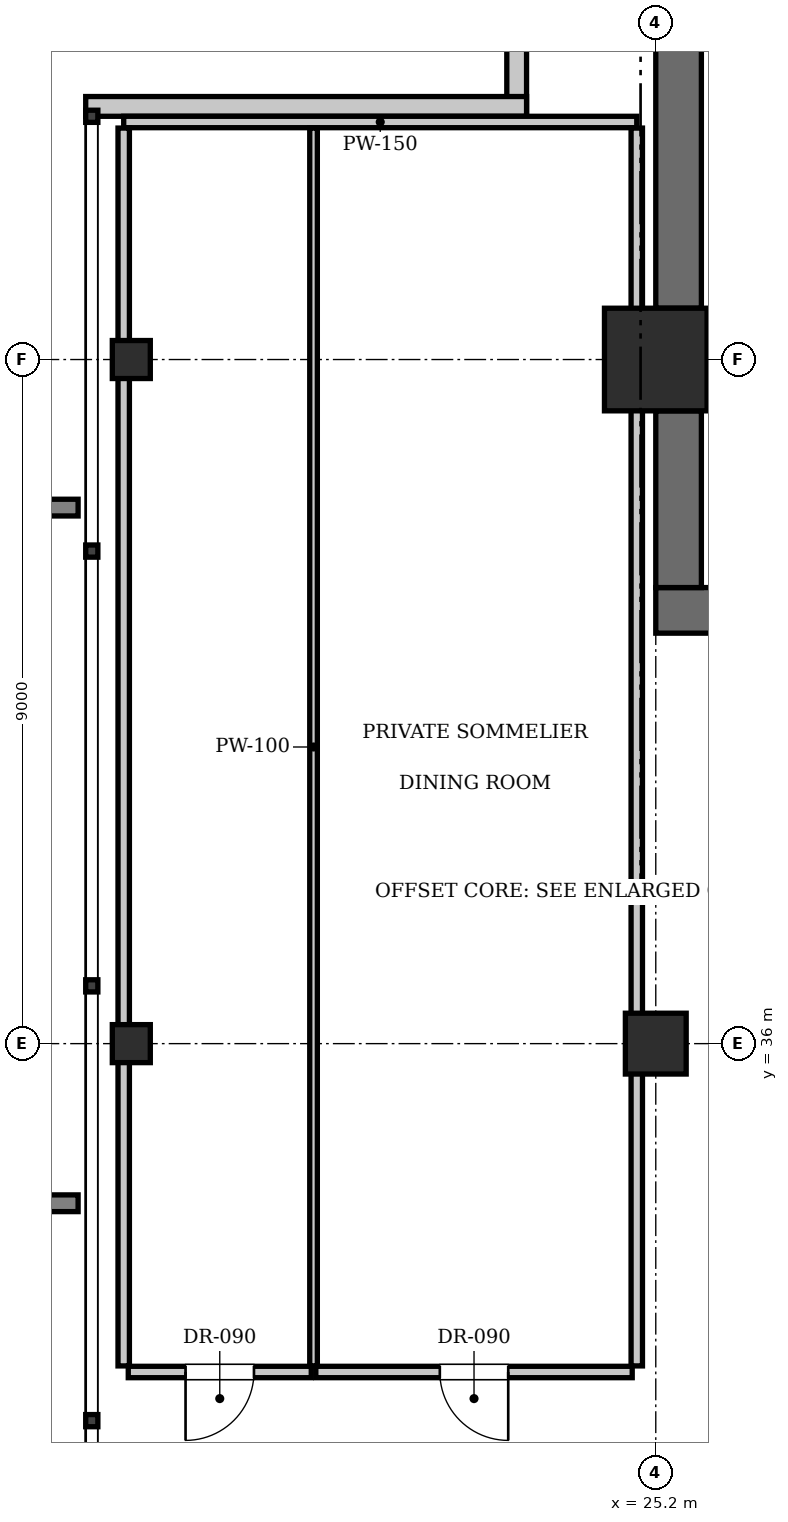
"""IFC4 building model, lengths in metres.
Left out: names, types, materials, properties, quantities, classifications, styles, units other than length and angle.
Written with IfcOpenShell. Run it as: python <this file> out.ifc"""

import sys

from ifc_helpers import new_model, si_unit, direction, frame, frame_2d, origin, origin_2d, place, context, subcontext, project, spatial, rectangle, i_section, extrude, element, fill, save


model = new_model("IFC4")
c1 = context("Model", 3, precision=1e-05, world=origin(), true_north=direction((0.0, 1.0)))
c2 = subcontext(c1, "Body", "Model", "MODEL_VIEW")
j1 = project(units=[si_unit("LENGTHUNIT", "METRE"), si_unit("PLANEANGLEUNIT", "RADIAN")], contexts=[c1])
p1 = place(None, origin())
s1 = spatial("IfcSite", under=j1, at=p1, CompositionType="ELEMENT")
p2 = place(p1, origin())
s2 = spatial("IfcBuilding", under=s1, at=p2, CompositionType="ELEMENT")
p3 = place(p2, frame((0.0, 0.0, 341.25)))
s3 = spatial("IfcBuildingStorey", under=s2, at=p3, CompositionType="ELEMENT", Elevation=341.25)
p4 = place(p3, frame((25.2, 45.0, 0.0), z_axis=(0.0, 0.0, 1.0), x_axis=(1.0, 0.0, 0.0)))
e1 = element("IfcColumn", 1, at=p4, inside=s3, PredefinedType="COLUMN", context=c2, shape_type="SweptSolid", body=[
    extrude(rectangle(XDim=1.35, YDim=1.35, at=origin_2d()), origin(), (0.0, 0.0, 1.0), 3.85),
])
p5 = place(p3, frame((25.2, 41.7, 0.0), z_axis=(0.0, 0.0, 1.0), x_axis=(1.0, 0.0, 0.0)))
e2 = element("IfcWall", 2, at=p5, inside=s3, PredefinedType="SHEAR", context=c2, shape_type="SweptSolid", body=[
    extrude(rectangle(XDim=6.8, YDim=0.6, at=frame_2d((3.4, 0.0))), origin(), (0.0, 0.0, 1.0), 3.85),
])
p6 = place(p5, frame((1.65, 0.0, 0.0)))
e3 = element("IfcOpeningElement", 3, at=p6, cuts=e2, PredefinedType="OPENING", context=c2, shape_type="SweptSolid", body=[
    extrude(rectangle(XDim=1.15, YDim=2.15, at=frame_2d((0.575, 1.075))), frame((0.0, 0.31, 0.0), z_axis=(0.0, -1.0, 0.0), x_axis=(1.0, 0.0, 0.0)), (0.0, 0.0, 1.0), 0.62),
])
p7 = place(p5, frame((5.15, 0.0, 0.0)))
e4 = element("IfcOpeningElement", 4, at=p7, cuts=e2, PredefinedType="OPENING", context=c2, shape_type="SweptSolid", body=[
    extrude(rectangle(XDim=1.1, YDim=2.2, at=frame_2d((0.55, 1.1))), frame((0.0, 0.31, 0.0), z_axis=(0.0, -1.0, 0.0), x_axis=(1.0, 0.0, 0.0)), (0.0, 0.0, 1.0), 0.62),
])
p8 = place(p3, frame((25.5, 42.0, 0.0), z_axis=(0.0, 0.0, 1.0), x_axis=(0.0, 1.0, 0.0)))
e5 = element("IfcWall", 5, at=p8, inside=s3, PredefinedType="SHEAR", context=c2, shape_type="SweptSolid", body=[
    extrude(rectangle(XDim=2.325, YDim=0.6, at=frame_2d((1.163, 0.0))), origin(), (0.0, 0.0, 1.0), 3.85),
])
p9 = place(p3, frame((25.5, 45.675, 0.0), z_axis=(0.0, 0.0, 1.0), x_axis=(0.0, 1.0, 0.0)))
e6 = element("IfcWall", 6, at=p9, inside=s3, PredefinedType="SHEAR", context=c2, shape_type="SweptSolid", body=[
    extrude(rectangle(XDim=7.725, YDim=0.6, at=frame_2d((3.862, 0.0))), origin(), (0.0, 0.0, 1.0), 3.85),
])
p10 = place(p3, frame((25.2, 36.0, 0.0), z_axis=(0.0, 0.0, 1.0), x_axis=(1.0, 0.0, 0.0)))
e7 = element("IfcColumn", 7, at=p10, inside=s3, PredefinedType="COLUMN", context=c2, shape_type="SweptSolid", body=[
    extrude(rectangle(XDim=0.8, YDim=0.8, at=origin_2d()), origin(), (0.0, 0.0, 1.0), 3.85),
])
for number, where, z_axis, x_axis in (
    (8, (18.3, 36.0, 0.0), (0.0, 0.0, 1.0), (1.0, 0.0, 0.0)),
    (9, (18.3, 45.0, 0.0), (0.0, 0.0, 1.0), (1.0, 0.0, 0.0)),
):
    element("IfcColumn", number, at=place(p3, frame(where, z_axis=z_axis, x_axis=x_axis)), inside=s3, PredefinedType="COLUMN", context=c2, shape_type="SweptSolid", body=[
        extrude(i_section(OverallWidth=0.5, OverallDepth=0.5, WebThickness=0.022, FlangeThickness=0.032, at=origin_2d()), origin(), (0.0, 0.0, 1.0), 3.85),
    ])
for number, where, z_axis, x_axis in (
    (10, (23.37, 48.2, 0.0), (0.0, 0.0, 1.0), (0.0, 1.0, 0.0)),
    (11, (17.7, 48.33, 0.0), (0.0, 0.0, 1.0), (1.0, 0.0, 0.0)),
):
    element("IfcWall", number, at=place(p3, frame(where, z_axis=z_axis, x_axis=x_axis)), inside=s3, PredefinedType="SOLIDWALL", context=c2, shape_type="SweptSolid", body=[
        extrude(rectangle(XDim=5.8, YDim=0.26, at=frame_2d((2.9, 0.0))), origin(), (0.0, 0.0, 1.0), 3.61),
    ])
p11 = place(p3, frame((18.2, 48.125, 0.0), z_axis=(0.0, 0.0, 1.0), x_axis=(1.0, 0.0, 0.0)))
e12 = element("IfcWall", 12, at=p11, inside=s3, PredefinedType="PARTITIONING", context=c2, shape_type="SweptSolid", body=[
    extrude(rectangle(XDim=6.75, YDim=0.15, at=frame_2d((3.375, 0.0))), origin(), (0.0, 0.0, 1.0), 3.61),
])
p12 = place(p3, frame((18.2, 31.76, 0.0), z_axis=(0.0, 0.0, 1.0), x_axis=(0.0, 1.0, 0.0)))
e13 = element("IfcWall", 13, at=p12, inside=s3, PredefinedType="PARTITIONING", context=c2, shape_type="SweptSolid", body=[
    extrude(rectangle(XDim=16.285, YDim=0.15, at=frame_2d((8.143, 0.0))), origin(), (0.0, 0.0, 1.0), 3.141),
])
p13 = place(p3, frame((24.95, 31.76, 0.0), z_axis=(0.0, 0.0, 1.0), x_axis=(0.0, 1.0, 0.0)))
e14 = element("IfcWall", 14, at=p13, inside=s3, PredefinedType="PARTITIONING", context=c2, shape_type="SweptSolid", body=[
    extrude(rectangle(XDim=16.285, YDim=0.15, at=frame_2d((8.143, 0.0))), origin(), (0.0, 0.0, 1.0), 3.61),
])
p14 = place(p3, frame((18.26, 31.68, 0.0), z_axis=(0.0, 0.0, 1.0), x_axis=(1.0, 0.0, 0.0)))
e15 = element("IfcWall", 15, at=p14, inside=s3, PredefinedType="PARTITIONING", context=c2, shape_type="SweptSolid", body=[
    extrude(rectangle(XDim=2.407, YDim=0.15, at=frame_2d((1.204, 0.0))), origin(), (0.0, 0.0, 1.0), 3.61),
])
p15 = place(p14, frame((0.754, 0.0, 0.0)))
e16 = element("IfcOpeningElement", 16, at=p15, cuts=e15, PredefinedType="OPENING", context=c2, shape_type="SweptSolid", body=[
    extrude(rectangle(XDim=0.9, YDim=2.1, at=frame_2d((0.45, 1.05))), frame((0.0, 0.085, 0.0), z_axis=(0.0, -1.0, 0.0), x_axis=(1.0, 0.0, 0.0)), (0.0, 0.0, 1.0), 0.17),
])
p16 = place(p3, frame((20.698, 31.76, 0.0), z_axis=(0.0, 0.0, 1.0), x_axis=(0.0, 1.0, 0.0)))
e17 = element("IfcWall", 17, at=p16, inside=s3, PredefinedType="PARTITIONING", context=c2, shape_type="SweptSolid", body=[
    extrude(rectangle(XDim=16.285, YDim=0.1, at=frame_2d((8.143, 0.0))), origin(), (0.0, 0.0, 1.0), 3.61),
])
p17 = place(p3, frame((20.728, 31.68, 0.0), z_axis=(0.0, 0.0, 1.0), x_axis=(1.0, 0.0, 0.0)))
e18 = element("IfcWall", 18, at=p17, inside=s3, PredefinedType="PARTITIONING", context=c2, shape_type="SweptSolid", body=[
    extrude(rectangle(XDim=4.162, YDim=0.15, at=frame_2d((2.081, 0.0))), origin(), (0.0, 0.0, 1.0), 3.61),
])
p18 = place(p17, frame((1.631, 0.0, 0.0)))
e19 = element("IfcOpeningElement", 19, at=p18, cuts=e18, PredefinedType="OPENING", context=c2, shape_type="SweptSolid", body=[
    extrude(rectangle(XDim=0.9, YDim=2.1, at=frame_2d((0.45, 1.05))), frame((0.0, 0.085, 0.0), z_axis=(0.0, -1.0, 0.0), x_axis=(1.0, 0.0, 0.0)), (0.0, 0.0, 1.0), 0.17),
])
p19 = place(p15, frame((0.9, 0.0, 0.0), z_axis=(0.0, 0.0, 1.0), x_axis=(-1.0, 0.0, 0.0)))
e20 = element("IfcDoor", 20, at=p19, inside=s3, OperationType="SINGLE_SWING_RIGHT", PredefinedType="DOOR", context=c2, shape_type="SweptSolid", body=[
    extrude(rectangle(XDim=0.9, YDim=2.1, at=frame_2d((0.45, 1.05))), frame((0.0, 0.025, 0.0), z_axis=(0.0, -1.0, 0.0), x_axis=(1.0, 0.0, 0.0)), (0.0, 0.0, 1.0), 0.05),
])
fill(e16, e20)
p20 = place(p18, frame((0.9, 0.0, 0.0), z_axis=(0.0, 0.0, 1.0), x_axis=(-1.0, 0.0, 0.0)))
e21 = element("IfcDoor", 21, at=p20, inside=s3, OperationType="SINGLE_SWING_LEFT", PredefinedType="DOOR", context=c2, shape_type="SweptSolid", body=[
    extrude(rectangle(XDim=0.9, YDim=2.1, at=frame_2d((0.45, 1.05))), frame((0.0, 0.025, 0.0), z_axis=(0.0, -1.0, 0.0), x_axis=(1.0, 0.0, 0.0)), (0.0, 0.0, 1.0), 0.05),
])
fill(e19, e21)
save(model, sys.argv[1])
